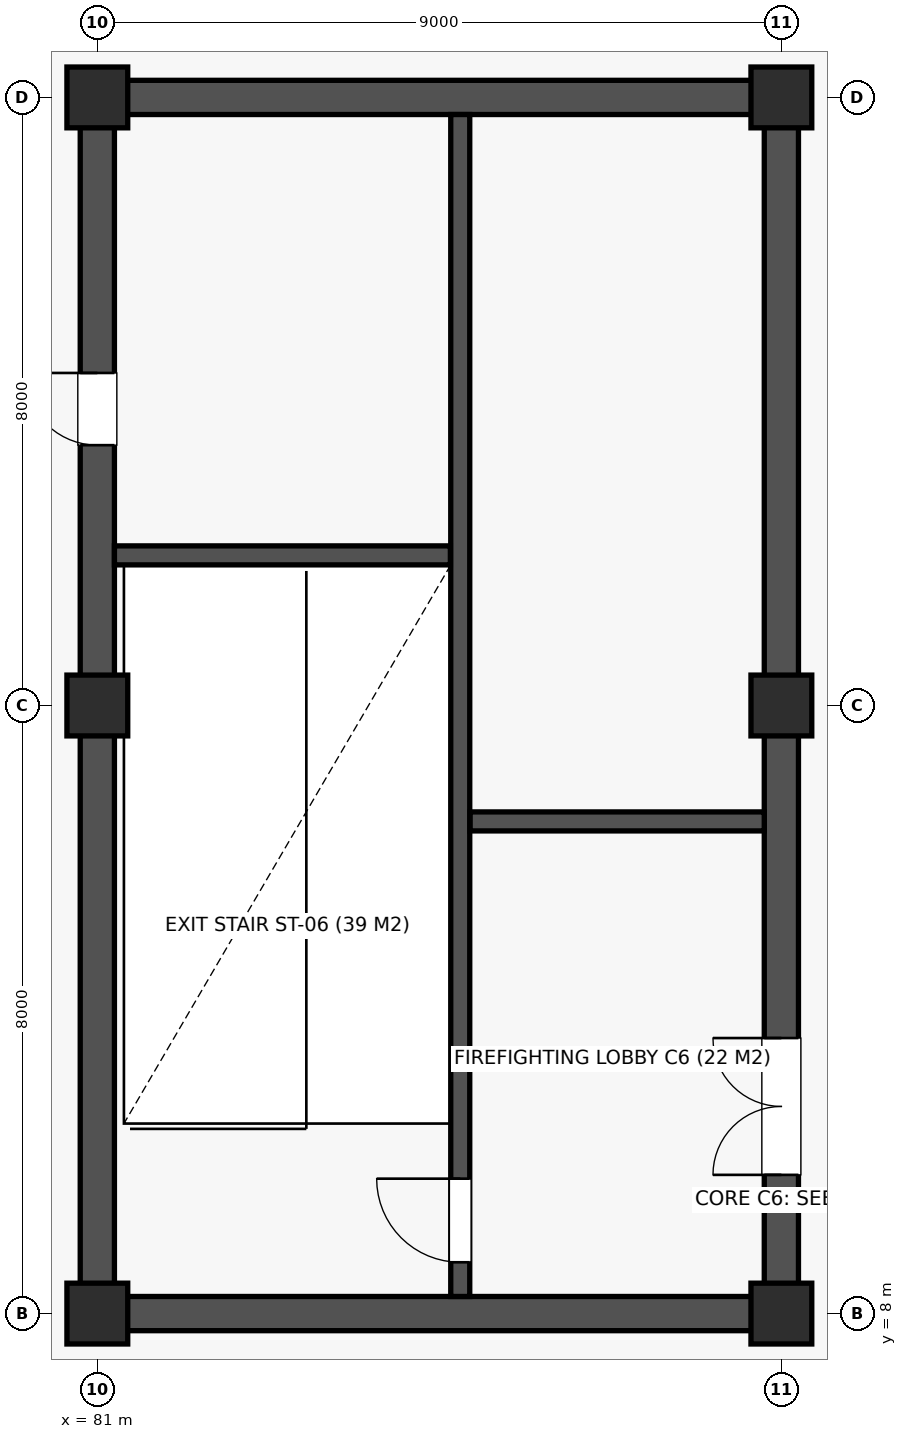
"""IFC4 building model, lengths in metres.
Left out: names, types, materials, properties, quantities, classifications, styles, units other than length and angle.
Written with IfcOpenShell. Run it as: python <this file> out.ifc"""

import sys

from ifc_helpers import new_model, si_unit, direction, frame, frame_2d, origin, origin_2d, place, context, subcontext, project, spatial, rectangle, extrude, element, fill, save


model = new_model("IFC4")
c1 = context("Model", 3, precision=1e-05, world=origin(), true_north=direction((0.0, 1.0)))
c2 = subcontext(c1, "Body", "Model", "MODEL_VIEW")
j1 = project(units=[si_unit("LENGTHUNIT", "METRE"), si_unit("PLANEANGLEUNIT", "RADIAN")], contexts=[c1])
p1 = place(None, origin())
s1 = spatial("IfcSite", under=j1, at=p1, CompositionType="ELEMENT")
p2 = place(p1, origin())
s2 = spatial("IfcBuilding", under=s1, at=p2, CompositionType="ELEMENT")
p3 = place(p2, frame((0.0, 0.0, 13.5)))
s3 = spatial("IfcBuildingStorey", under=s2, at=p3, CompositionType="ELEMENT", Elevation=13.5)
for number, where, z_axis, x_axis in (
    (1, (81.0, 8.0, 0.0), (0.0, 0.0, 1.0), (1.0, 0.0, 0.0)),
    (2, (81.0, 16.0, 0.0), (0.0, 0.0, 1.0), (1.0, 0.0, 0.0)),
    (3, (81.0, 24.0, 0.0), (0.0, 0.0, 1.0), (1.0, 0.0, 0.0)),
    (4, (90.0, 8.0, 0.0), (0.0, 0.0, 1.0), (1.0, 0.0, 0.0)),
    (5, (90.0, 16.0, 0.0), (0.0, 0.0, 1.0), (1.0, 0.0, 0.0)),
    (6, (90.0, 24.0, 0.0), (0.0, 0.0, 1.0), (1.0, 0.0, 0.0)),
):
    element("IfcColumn", number, at=place(p3, frame(where, z_axis=z_axis, x_axis=x_axis)), inside=s3, PredefinedType="COLUMN", context=c2, shape_type="SweptSolid", body=[
        extrude(rectangle(XDim=0.8, YDim=0.8, at=origin_2d()), origin(), (0.0, 0.0, 1.0), 4.2),
    ])
for number, where, z_axis, x_axis in (
    (7, (81.225, 8.0, 0.0), (0.0, 0.0, 1.0), (1.0, 0.0, 0.0)),
    (8, (81.225, 24.0, 0.0), (0.0, 0.0, 1.0), (1.0, 0.0, 0.0)),
):
    element("IfcWall", number, at=place(p3, frame(where, z_axis=z_axis, x_axis=x_axis)), inside=s3, PredefinedType="SHEAR", context=c2, shape_type="SweptSolid", body=[
        extrude(rectangle(XDim=8.55, YDim=0.45, at=frame_2d((4.275, 0.0))), origin(), (0.0, 0.0, 1.0), 4.2),
    ])
p4 = place(p3, frame((81.0, 8.225, 0.0), z_axis=(0.0, 0.0, 1.0), x_axis=(0.0, 1.0, 0.0)))
e9 = element("IfcWall", 9, at=p4, inside=s3, PredefinedType="SHEAR", context=c2, shape_type="SweptSolid", body=[
    extrude(rectangle(XDim=15.55, YDim=0.45, at=frame_2d((7.775, 0.0))), origin(), (0.0, 0.0, 1.0), 4.2),
])
p5 = place(p4, frame((11.2, 0.0, 0.0)))
e10 = element("IfcOpeningElement", 10, at=p5, cuts=e9, PredefinedType="OPENING", context=c2, shape_type="SweptSolid", body=[
    extrude(rectangle(XDim=0.95, YDim=2.1, at=frame_2d((0.475, 1.05))), frame((0.0, 0.237, 0.0), z_axis=(0.0, -1.0, 0.0), x_axis=(1.0, 0.0, 0.0)), (0.0, 0.0, 1.0), 0.474),
])
p6 = place(p3, frame((90.0, 8.225, 0.0), z_axis=(0.0, 0.0, 1.0), x_axis=(0.0, 1.0, 0.0)))
e11 = element("IfcWall", 11, at=p6, inside=s3, PredefinedType="SHEAR", context=c2, shape_type="SweptSolid", body=[
    extrude(rectangle(XDim=15.55, YDim=0.45, at=frame_2d((7.775, 0.0))), origin(), (0.0, 0.0, 1.0), 4.2),
])
p7 = place(p6, frame((1.6, 0.0, 0.0)))
e12 = element("IfcOpeningElement", 12, at=p7, cuts=e11, PredefinedType="OPENING", context=c2, shape_type="SweptSolid", body=[
    extrude(rectangle(XDim=1.8, YDim=2.18, at=frame_2d((0.9, 1.09))), frame((0.0, 0.237, 0.0), z_axis=(0.0, -1.0, 0.0), x_axis=(1.0, 0.0, 0.0)), (0.0, 0.0, 1.0), 0.474),
])
p8 = place(p3, frame((85.775, 8.225, 0.0), z_axis=(0.0, 0.0, 1.0), x_axis=(0.0, 1.0, 0.0)))
e13 = element("IfcWall", 13, at=p8, inside=s3, PredefinedType="SOLIDWALL", context=c2, shape_type="SweptSolid", body=[
    extrude(rectangle(XDim=15.55, YDim=0.25, at=frame_2d((7.775, 0.0))), origin(), (0.0, 0.0, 1.0), 4.2),
])
p9 = place(p8, frame((0.45, 0.0, 0.0)))
e14 = element("IfcOpeningElement", 14, at=p9, cuts=e13, PredefinedType="OPENING", context=c2, shape_type="SweptSolid", body=[
    extrude(rectangle(XDim=1.1, YDim=2.15, at=frame_2d((0.55, 1.075))), frame((0.0, 0.137, 0.0), z_axis=(0.0, -1.0, 0.0), x_axis=(1.0, 0.0, 0.0)), (0.0, 0.0, 1.0), 0.274),
])
p10 = place(p3, frame((81.225, 17.975, 0.0), z_axis=(0.0, 0.0, 1.0), x_axis=(1.0, 0.0, 0.0)))
e15 = element("IfcWall", 15, at=p10, inside=s3, PredefinedType="SOLIDWALL", context=c2, shape_type="SweptSolid", body=[
    extrude(rectangle(XDim=4.42, YDim=0.25, at=frame_2d((2.21, 0.0))), origin(), (0.0, 0.0, 1.0), 4.2),
])
p11 = place(p3, frame((85.905, 14.475, 0.0), z_axis=(0.0, 0.0, 1.0), x_axis=(1.0, 0.0, 0.0)))
e16 = element("IfcWall", 16, at=p11, inside=s3, PredefinedType="SOLIDWALL", context=c2, shape_type="SweptSolid", body=[
    extrude(rectangle(XDim=3.87, YDim=0.25, at=frame_2d((1.935, 0.0))), origin(), (0.0, 0.0, 1.0), 4.2),
])
p12 = place(p7, origin())
e17 = element("IfcDoor", 17, at=p12, inside=s3, OperationType="DOUBLE_DOOR_SINGLE_SWING", PredefinedType="DOOR", context=c2, shape_type="SweptSolid", body=[
    extrude(rectangle(XDim=1.8, YDim=2.18, at=frame_2d((0.9, 1.09))), frame((0.0, 0.025, 0.0), z_axis=(0.0, -1.0, 0.0), x_axis=(1.0, 0.0, 0.0)), (0.0, 0.0, 1.0), 0.05),
])
fill(e12, e17)
p13 = place(p9, origin())
e18 = element("IfcDoor", 18, at=p13, inside=s3, OperationType="SINGLE_SWING_RIGHT", PredefinedType="DOOR", context=c2, shape_type="SweptSolid", body=[
    extrude(rectangle(XDim=1.1, YDim=2.15, at=frame_2d((0.55, 1.075))), frame((0.0, 0.025, 0.0), z_axis=(0.0, -1.0, 0.0), x_axis=(1.0, 0.0, 0.0)), (0.0, 0.0, 1.0), 0.05),
])
fill(e14, e18)
p14 = place(p5, origin())
e19 = element("IfcDoor", 19, at=p14, inside=s3, OperationType="SINGLE_SWING_RIGHT", PredefinedType="DOOR", context=c2, shape_type="SweptSolid", body=[
    extrude(rectangle(XDim=0.95, YDim=2.1, at=frame_2d((0.475, 1.05))), frame((0.0, 0.025, 0.0), z_axis=(0.0, -1.0, 0.0), x_axis=(1.0, 0.0, 0.0)), (0.0, 0.0, 1.0), 0.05),
])
fill(e10, e19)
save(model, sys.argv[1])
